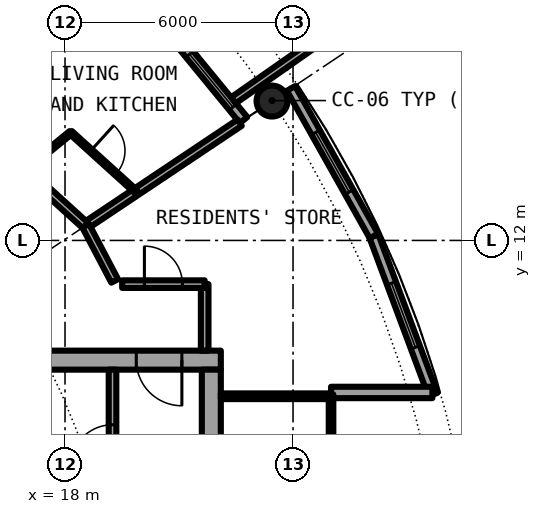
"""IFC4 building model, lengths in metres.
Left out: names, types, materials, properties, quantities, classifications, styles, units other than length and angle.
Written with IfcOpenShell. Run it as: python <this file> out.ifc"""

import sys

from ifc_helpers import new_model, si_unit, direction, frame, frame_2d, origin, origin_2d, place, context, subcontext, project, spatial, rectangle, hollow_circle, extrude, element, fill, save


model = new_model("IFC4")
c1 = context("Model", 3, precision=1e-05, world=origin(), true_north=direction((0.0, 1.0)))
c2 = subcontext(c1, "Body", "Model", "MODEL_VIEW")
j1 = project(units=[si_unit("LENGTHUNIT", "METRE"), si_unit("PLANEANGLEUNIT", "RADIAN")], contexts=[c1])
p1 = place(None, origin())
s1 = spatial("IfcSite", under=j1, at=p1, CompositionType="ELEMENT")
p2 = place(p1, origin())
s2 = spatial("IfcBuilding", under=s1, at=p2, CompositionType="ELEMENT")
p3 = place(p2, frame((0.0, 0.0, 151.3)))
s3 = spatial("IfcBuildingStorey", under=s2, at=p3, CompositionType="ELEMENT", Elevation=151.3)
p4 = place(p3, frame((23.448, 15.667, 0.0), z_axis=(0.0, 0.0, 1.0), x_axis=(1.0, 0.0, 0.0)))
e1 = element("IfcColumn", 1, at=p4, inside=s3, PredefinedType="COLUMN", context=c2, shape_type="SweptSolid", body=[
    extrude(hollow_circle(Radius=0.406, WallThickness=0.04, at=origin_2d()), origin(), (0.0, 0.0, 1.0), 3.05),
])
p5 = place(p3, frame((22.699, 15.167, 0.0), z_axis=(0.0, 0.0, 1.0), x_axis=(-0.634382322723, 0.773019449054, 0.0)))
e2 = element("IfcWall", 2, at=p5, inside=s3, PredefinedType="SOLIDWALL", context=c2, shape_type="SweptSolid", body=[
    extrude(rectangle(XDim=5.352, YDim=0.25, at=frame_2d((2.676, 0.0))), origin(), (0.0, 0.0, 1.0), 2.7),
])
p6 = place(p5, frame((0.441, 0.0, 0.3)))
e3 = element("IfcOpeningElement", 3, at=p6, cuts=e2, PredefinedType="OPENING", context=c2, shape_type="SweptSolid", body=[
    extrude(rectangle(XDim=1.8, YDim=2.1, at=frame_2d((0.9, 1.05))), frame((0.0, 0.135, 0.0), z_axis=(0.0, -1.0, 0.0), x_axis=(1.0, 0.0, 0.0)), (0.0, 0.0, 1.0), 0.27),
])
p7 = place(p5, frame((3.51, 0.0, 0.0)))
e4 = element("IfcOpeningElement", 4, at=p7, cuts=e2, PredefinedType="OPENING", context=c2, shape_type="SweptSolid", body=[
    extrude(rectangle(XDim=1.0, YDim=2.2, at=frame_2d((0.5, 1.1))), frame((0.0, 0.135, 0.0), z_axis=(0.0, -1.0, 0.0), x_axis=(1.0, 0.0, 0.0)), (0.0, 0.0, 1.0), 0.27),
])
p8 = place(p3, frame((22.433, 15.688, -0.03), z_axis=(0.0, 0.0, 1.0), x_axis=(0.819373043115, 0.573260687834, 0.0)))
e5 = element("IfcWall", 5, at=p8, inside=s3, PredefinedType="SOLIDWALL", context=c2, shape_type="SweptSolid", body=[
    extrude(rectangle(XDim=2.925, YDim=0.2, at=frame_2d((1.463, 0.0))), origin(), (0.0, 0.0, 1.0), 2.73),
])
p9 = place(p3, frame((27.682, 7.945, 0.0), z_axis=(0.0, 0.0, 1.0), x_axis=(-0.349247811493, 0.937030397675, 0.0)))
e6 = element("IfcWall", 6, at=p9, inside=s3, PredefinedType="SOLIDWALL", context=c2, shape_type="SweptSolid", body=[
    extrude(rectangle(XDim=4.452, YDim=0.25, at=frame_2d((2.226, 0.0))), origin(), (0.0, 0.0, 1.0), 2.7),
])
p10 = place(p9, frame((1.327, 0.0, 0.3)))
e7 = element("IfcOpeningElement", 7, at=p10, cuts=e6, PredefinedType="OPENING", context=c2, shape_type="SweptSolid", body=[
    extrude(rectangle(XDim=1.8, YDim=2.1, at=frame_2d((0.9, 1.05))), frame((0.0, 0.135, 0.0), z_axis=(0.0, -1.0, 0.0), x_axis=(1.0, 0.0, 0.0)), (0.0, 0.0, 1.0), 0.27),
])
p11 = place(p3, frame((26.127, 12.117, 0.0), z_axis=(0.0, 0.0, 1.0), x_axis=(-0.489696356642, 0.871893042919, 0.0)))
e8 = element("IfcWall", 8, at=p11, inside=s3, PredefinedType="SOLIDWALL", context=c2, shape_type="SweptSolid", body=[
    extrude(rectangle(XDim=4.454, YDim=0.25, at=frame_2d((2.227, 0.0))), origin(), (0.0, 0.0, 1.0), 2.7),
])
p12 = place(p11, frame((1.327, 0.0, 0.3)))
e9 = element("IfcOpeningElement", 9, at=p12, cuts=e8, PredefinedType="OPENING", context=c2, shape_type="SweptSolid", body=[
    extrude(rectangle(XDim=1.8, YDim=2.1, at=frame_2d((0.9, 1.05))), frame((0.0, 0.135, 0.0), z_axis=(0.0, -1.0, 0.0), x_axis=(1.0, 0.0, 0.0)), (0.0, 0.0, 1.0), 0.27),
])
p13 = place(p3, frame((25.0, 8.0, 0.0), z_axis=(0.0, 0.0, 1.0), x_axis=(1.0, 0.0, 0.0)))
e10 = element("IfcWall", 10, at=p13, inside=s3, PredefinedType="SOLIDWALL", context=c2, shape_type="SweptSolid", body=[
    extrude(rectangle(XDim=2.667, YDim=0.3, at=frame_2d((1.333, 0.0))), origin(), (0.0, 0.0, 1.0), 2.7),
])
p14 = place(p3, frame((22.1, 8.85, 0.0), z_axis=(0.0, 0.0, 1.0), x_axis=(-1.0, 0.0, 0.0)))
e11 = element("IfcWall", 11, at=p14, inside=s3, PredefinedType="SHEAR", context=c2, shape_type="SweptSolid", body=[
    extrude(rectangle(XDim=13.6, YDim=0.5, at=frame_2d((6.8, 0.0))), origin(), (0.0, 0.0, 1.0), 3.05),
])
p15 = place(p14, frame((1.025, 0.0, 0.0)))
e12 = element("IfcOpeningElement", 12, at=p15, cuts=e11, PredefinedType="OPENING", context=c2, shape_type="SweptSolid", body=[
    extrude(rectangle(XDim=1.2, YDim=2.3, at=frame_2d((0.6, 1.15))), frame((0.0, 0.26, 0.0), z_axis=(0.0, -1.0, 0.0), x_axis=(1.0, 0.0, 0.0)), (0.0, 0.0, 1.0), 0.52),
])
p16 = place(p3, frame((21.85, 8.6, 0.0), z_axis=(0.0, 0.0, 1.0), x_axis=(0.0, -1.0, 0.0)))
e13 = element("IfcWall", 13, at=p16, inside=s3, PredefinedType="SHEAR", context=c2, shape_type="SweptSolid", body=[
    extrude(rectangle(XDim=17.2, YDim=0.5, at=frame_2d((8.6, 0.0))), origin(), (0.0, 0.0, 1.0), 3.05),
])
p17 = place(p16, frame((7.7, 0.0, 0.0)))
e14 = element("IfcOpeningElement", 14, at=p17, cuts=e13, PredefinedType="OPENING", context=c2, shape_type="SweptSolid", body=[
    extrude(rectangle(XDim=1.8, YDim=2.3, at=frame_2d((0.9, 1.15))), frame((0.0, 0.26, 0.0), z_axis=(0.0, -1.0, 0.0), x_axis=(1.0, 0.0, 0.0)), (0.0, 0.0, 1.0), 0.52),
])
p18 = place(p3, frame((19.25, 1.575, 0.0), z_axis=(0.0, 0.0, 1.0), x_axis=(0.0, 1.0, 0.0)))
e15 = element("IfcWall", 15, at=p18, inside=s3, PredefinedType="SOLIDWALL", context=c2, shape_type="SweptSolid", body=[
    extrude(rectangle(XDim=7.025, YDim=0.2, at=frame_2d((3.513, 0.0))), origin(), (0.0, 0.0, 1.0), 2.7),
])
p19 = place(p18, frame((4.475, 0.0, 0.0)))
e16 = element("IfcOpeningElement", 16, at=p19, cuts=e15, PredefinedType="OPENING", context=c2, shape_type="SweptSolid", body=[
    extrude(rectangle(XDim=1.1, YDim=2.3, at=frame_2d((0.55, 1.15))), frame((0.0, 0.11, 0.0), z_axis=(0.0, -1.0, 0.0), x_axis=(1.0, 0.0, 0.0)), (0.0, 0.0, 1.0), 0.22),
])
p20 = place(p3, frame((22.1, 7.9, 0.0), z_axis=(0.0, 0.0, 1.0), x_axis=(1.0, 0.0, 0.0)))
e17 = element("IfcWall", 17, at=p20, inside=s3, PredefinedType="PARTITIONING", context=c2, shape_type="SweptSolid", body=[
    extrude(rectangle(XDim=2.84, YDim=0.15, at=frame_2d((1.42, 0.0))), origin(), (0.0, 0.0, 1.0), 2.7),
])
p21 = place(p3, frame((25.0, -7.95, 0.0), z_axis=(0.0, 0.0, 1.0), x_axis=(0.0, 1.0, 0.0)))
e18 = element("IfcWall", 18, at=p21, inside=s3, PredefinedType="PARTITIONING", context=c2, shape_type="SweptSolid", body=[
    extrude(rectangle(XDim=15.9, YDim=0.12, at=frame_2d((7.95, 0.0))), origin(), (0.0, 0.0, 1.0), 2.7),
])
p22 = place(p21, frame((0.95, 0.0, 0.1)))
e19 = element("IfcOpeningElement", 19, at=p22, cuts=e18, PredefinedType="OPENING", context=c2, shape_type="SweptSolid", body=[
    extrude(rectangle(XDim=14.0, YDim=2.35, at=frame_2d((7.0, 1.175))), frame((0.0, 0.07, 0.0), z_axis=(0.0, -1.0, 0.0), x_axis=(1.0, 0.0, 0.0)), (0.0, 0.0, 1.0), 0.14),
])
p23 = place(p3, frame((21.675, 9.1, 0.0), z_axis=(0.0, 0.0, 1.0), x_axis=(0.0, 1.0, 0.0)))
e20 = element("IfcWall", 20, at=p23, inside=s3, PredefinedType="PARTITIONING", context=c2, shape_type="SweptSolid", body=[
    extrude(rectangle(XDim=1.75, YDim=0.2, at=frame_2d((0.875, 0.0))), origin(), (0.0, 0.0, 1.0), 2.7),
])
p24 = place(p3, frame((16.43, 16.398, 0.0), z_axis=(0.0, 0.0, 1.0), x_axis=(0.707722727509, 0.706490297858, 0.0)))
e21 = element("IfcWall", 21, at=p24, inside=s3, PredefinedType="PARTITIONING", context=c2, shape_type="SweptSolid", body=[
    extrude(rectangle(XDim=3.962, YDim=0.1, at=frame_2d((1.981, 0.0))), origin(), (0.0, 0.0, 1.0), 2.7),
])
p25 = place(p24, frame((1.531, 0.0, 0.0)))
e22 = element("IfcOpeningElement", 22, at=p25, cuts=e21, PredefinedType="OPENING", context=c2, shape_type="SweptSolid", body=[
    extrude(rectangle(XDim=0.9, YDim=2.3, at=frame_2d((0.45, 1.15))), frame((0.0, 0.06, 0.0), z_axis=(0.0, -1.0, 0.0), x_axis=(1.0, 0.0, 0.0)), (0.0, 0.0, 1.0), 0.12),
])
p26 = place(p3, frame((16.936, 13.845, 0.0), z_axis=(0.0, 0.0, 1.0), x_axis=(0.774283039722, 0.632839453889, 0.0)))
e23 = element("IfcWall", 23, at=p26, inside=s3, PredefinedType="PARTITIONING", context=c2, shape_type="SweptSolid", body=[
    extrude(rectangle(XDim=1.569, YDim=0.1, at=frame_2d((0.785, 0.0))), origin(), (0.0, 0.0, 1.0), 2.7),
])
p27 = place(p3, frame((18.542, 12.389, 0.0), z_axis=(0.0, 0.0, 1.0), x_axis=(0.831387096605, 0.55569370664, 0.0)))
e24 = element("IfcWall", 24, at=p27, inside=s3, PredefinedType="PARTITIONING", context=c2, shape_type="SweptSolid", body=[
    extrude(rectangle(XDim=4.875, YDim=0.2, at=frame_2d((2.438, 0.0))), origin(), (0.0, 0.0, 1.0), 2.7),
])
p28 = place(p3, frame((19.504, 10.85, 0.0), z_axis=(0.0, 0.0, 1.0), x_axis=(1.0, 0.0, 0.0)))
e25 = element("IfcWall", 25, at=p28, inside=s3, PredefinedType="PARTITIONING", context=c2, shape_type="SweptSolid", body=[
    extrude(rectangle(XDim=2.171, YDim=0.2, at=frame_2d((1.085, 0.0))), origin(), (0.0, 0.0, 1.0), 2.7),
])
p29 = place(p28, frame((0.585, 0.0, 0.0)))
e26 = element("IfcOpeningElement", 26, at=p29, cuts=e25, PredefinedType="OPENING", context=c2, shape_type="SweptSolid", body=[
    extrude(rectangle(XDim=1.0, YDim=2.3, at=frame_2d((0.5, 1.15))), frame((0.0, 0.11, 0.0), z_axis=(0.0, -1.0, 0.0), x_axis=(1.0, 0.0, 0.0)), (0.0, 0.0, 1.0), 0.22),
])
p30 = place(p3, frame((10.512, 19.667, 0.0), z_axis=(0.0, 0.0, 1.0), x_axis=(0.740947367223, -0.671563101283, 0.0)))
e27 = element("IfcWall", 27, at=p30, inside=s3, PredefinedType="PARTITIONING", context=c2, shape_type="SweptSolid", body=[
    extrude(rectangle(XDim=10.837, YDim=0.2, at=frame_2d((5.419, 0.0))), origin(), (0.0, 0.0, 1.0), 2.7),
])
p31 = place(p30, frame((3.835, 0.0, 0.0)))
e28 = element("IfcOpeningElement", 28, at=p31, cuts=e27, PredefinedType="OPENING", context=c2, shape_type="SweptSolid", body=[
    extrude(rectangle(XDim=1.0, YDim=2.3, at=frame_2d((0.5, 1.15))), frame((0.0, 0.11, 0.0), z_axis=(0.0, -1.0, 0.0), x_axis=(1.0, 0.0, 0.0)), (0.0, 0.0, 1.0), 0.22),
])
p32 = place(p3, frame((18.542, 12.389, 0.0), z_axis=(0.0, 0.0, 1.0), x_axis=(0.465605550524, -0.884992356646, 0.0)))
e29 = element("IfcWall", 29, at=p32, inside=s3, PredefinedType="PARTITIONING", context=c2, shape_type="SweptSolid", body=[
    extrude(rectangle(XDim=1.643, YDim=0.2, at=frame_2d((0.821, 0.0))), origin(), (0.0, 0.0, 1.0), 2.7),
])
p33 = place(p3, frame((18.149, 14.84, 0.0), z_axis=(0.0, 0.0, 1.0), x_axis=(0.741127434804, -0.671364376014, 0.0)))
e30 = element("IfcWall", 30, at=p33, inside=s3, PredefinedType="PARTITIONING", context=c2, shape_type="SweptSolid", body=[
    extrude(rectangle(XDim=2.324, YDim=0.1, at=frame_2d((1.162, 0.0))), origin(), (0.0, 0.0, 1.0), 2.7),
])
p34 = place(p33, frame((0.714, 0.0, 0.0)))
e31 = element("IfcOpeningElement", 31, at=p34, cuts=e30, PredefinedType="OPENING", context=c2, shape_type="SweptSolid", body=[
    extrude(rectangle(XDim=0.9, YDim=2.3, at=frame_2d((0.45, 1.15))), frame((0.0, 0.06, 0.0), z_axis=(0.0, -1.0, 0.0), x_axis=(1.0, 0.0, 0.0)), (0.0, 0.0, 1.0), 0.12),
])
p35 = place(p6, origin())
e32 = element("IfcWindow", 32, at=p35, inside=s3, PartitioningType="SINGLE_PANEL", PredefinedType="WINDOW", context=c2, shape_type="SweptSolid", body=[
    extrude(rectangle(XDim=1.8, YDim=2.1, at=frame_2d((0.9, 1.05))), frame((0.0, 0.03, 0.0), z_axis=(0.0, -1.0, 0.0), x_axis=(1.0, 0.0, 0.0)), (0.0, 0.0, 1.0), 0.06),
])
fill(e3, e32)
p36 = place(p10, origin())
e33 = element("IfcWindow", 33, at=p36, inside=s3, PartitioningType="SINGLE_PANEL", PredefinedType="WINDOW", context=c2, shape_type="SweptSolid", body=[
    extrude(rectangle(XDim=1.8, YDim=2.1, at=frame_2d((0.9, 1.05))), frame((0.0, 0.03, 0.0), z_axis=(0.0, -1.0, 0.0), x_axis=(1.0, 0.0, 0.0)), (0.0, 0.0, 1.0), 0.06),
])
fill(e7, e33)
p37 = place(p12, origin())
e34 = element("IfcWindow", 34, at=p37, inside=s3, PartitioningType="SINGLE_PANEL", PredefinedType="WINDOW", context=c2, shape_type="SweptSolid", body=[
    extrude(rectangle(XDim=1.8, YDim=2.1, at=frame_2d((0.9, 1.05))), frame((0.0, 0.03, 0.0), z_axis=(0.0, -1.0, 0.0), x_axis=(1.0, 0.0, 0.0)), (0.0, 0.0, 1.0), 0.06),
])
fill(e9, e34)
p38 = place(p19, origin())
e35 = element("IfcDoor", 35, at=p38, inside=s3, OperationType="SINGLE_SWING_LEFT", PredefinedType="DOOR", context=c2, shape_type="SweptSolid", body=[
    extrude(rectangle(XDim=1.1, YDim=2.3, at=frame_2d((0.55, 1.15))), frame((0.0, 0.025, 0.0), z_axis=(0.0, -1.0, 0.0), x_axis=(1.0, 0.0, 0.0)), (0.0, 0.0, 1.0), 0.05),
])
fill(e16, e35)
p39 = place(p15, origin())
e36 = element("IfcDoor", 36, at=p39, inside=s3, OperationType="SINGLE_SWING_RIGHT", PredefinedType="DOOR", context=c2, shape_type="SweptSolid", body=[
    extrude(rectangle(XDim=1.2, YDim=2.3, at=frame_2d((0.6, 1.15))), frame((0.0, 0.025, 0.0), z_axis=(0.0, -1.0, 0.0), x_axis=(1.0, 0.0, 0.0)), (0.0, 0.0, 1.0), 0.05),
])
fill(e12, e36)
p40 = place(p22, origin())
e37 = element("IfcWindow", 37, at=p40, inside=s3, PartitioningType="SINGLE_PANEL", PredefinedType="WINDOW", context=c2, shape_type="SweptSolid", body=[
    extrude(rectangle(XDim=14.0, YDim=2.35, at=frame_2d((7.0, 1.175))), frame((0.0, 0.03, 0.0), z_axis=(0.0, -1.0, 0.0), x_axis=(1.0, 0.0, 0.0)), (0.0, 0.0, 1.0), 0.06),
])
fill(e19, e37)
p41 = place(p34, origin())
e38 = element("IfcDoor", 38, at=p41, inside=s3, OperationType="SINGLE_SWING_RIGHT", PredefinedType="DOOR", context=c2, shape_type="SweptSolid", body=[
    extrude(rectangle(XDim=0.9, YDim=2.3, at=frame_2d((0.45, 1.15))), frame((0.0, 0.025, 0.0), z_axis=(0.0, -1.0, 0.0), x_axis=(1.0, 0.0, 0.0)), (0.0, 0.0, 1.0), 0.05),
])
fill(e31, e38)
p42 = place(p29, origin())
e39 = element("IfcDoor", 39, at=p42, inside=s3, OperationType="SINGLE_SWING_LEFT", PredefinedType="DOOR", context=c2, shape_type="SweptSolid", body=[
    extrude(rectangle(XDim=1.0, YDim=2.3, at=frame_2d((0.5, 1.15))), frame((0.0, 0.025, 0.0), z_axis=(0.0, -1.0, 0.0), x_axis=(1.0, 0.0, 0.0)), (0.0, 0.0, 1.0), 0.05),
])
fill(e26, e39)
save(model, sys.argv[1])
